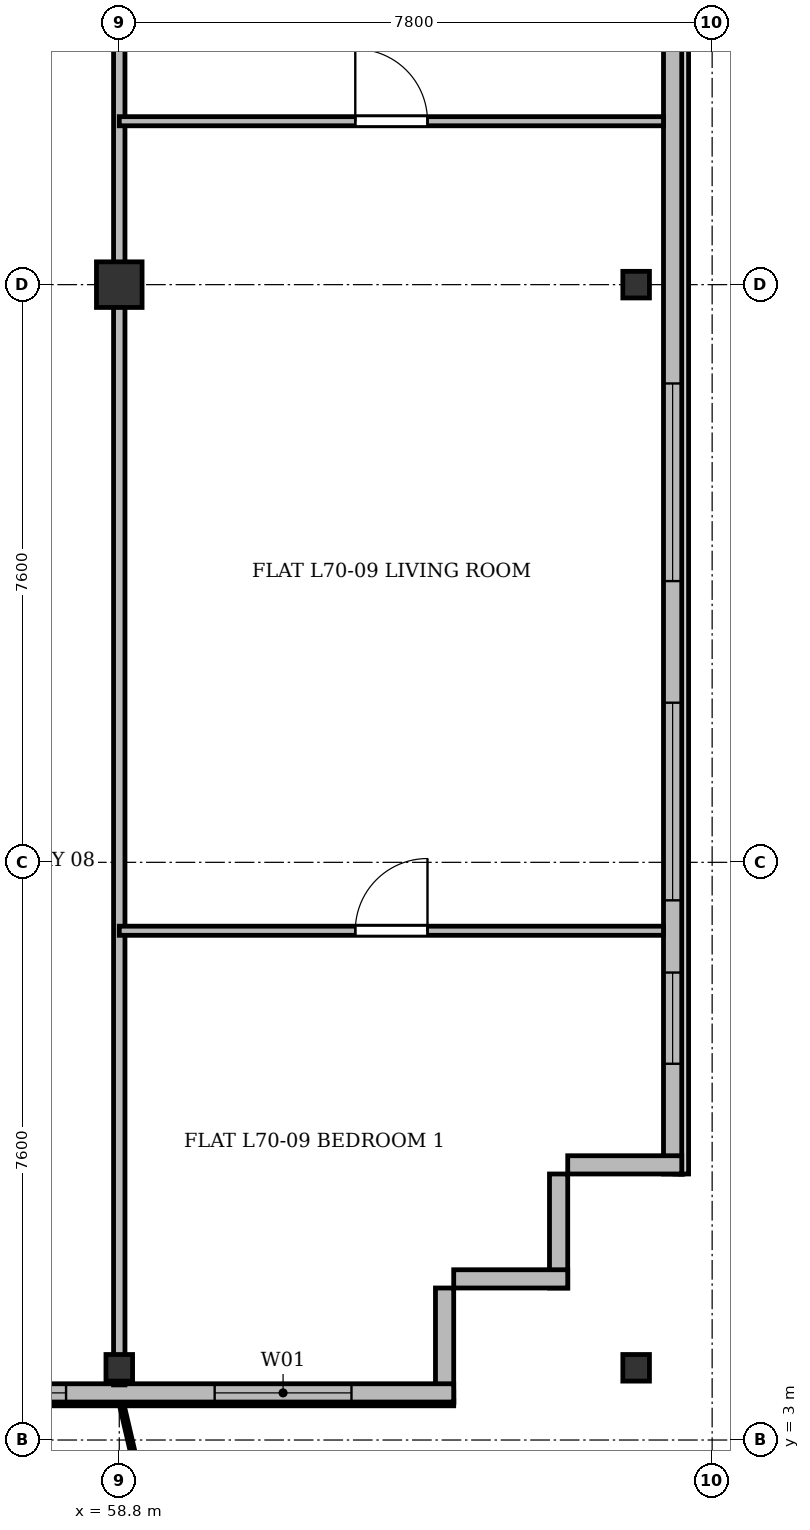
"""IFC4 building model, lengths in metres.
Left out: names, types, materials, properties, quantities, classifications, styles, units other than length and angle.
Written with IfcOpenShell. Run it as: python <this file> out.ifc"""

import sys

from ifc_helpers import new_model, si_unit, direction, frame, frame_2d, origin, origin_2d, place, context, subcontext, project, spatial, rectangle, i_section, extrude, source, transform, mapped, element, fill, save


model = new_model("IFC4")
c1 = context("Model", 3, precision=1e-05, world=origin(), true_north=direction((0.0, 1.0)))
c2 = subcontext(c1, "Body", "Model", "MODEL_VIEW")
j1 = project(units=[si_unit("LENGTHUNIT", "METRE"), si_unit("PLANEANGLEUNIT", "RADIAN")], contexts=[c1])
p1 = place(None, origin())
s1 = spatial("IfcSite", under=j1, at=p1, CompositionType="ELEMENT")
p2 = place(p1, origin())
s2 = spatial("IfcBuilding", under=s1, at=p2, CompositionType="ELEMENT")
p3 = place(p2, frame((0.0, 0.0, 270.3)))
s3 = spatial("IfcBuildingStorey", under=s2, at=p3, CompositionType="ELEMENT", Elevation=270.3)
m1 = source(origin(), c2, "Body", "SweptSolid", [
    extrude(i_section(OverallWidth=0.35, OverallDepth=0.35, WebThickness=0.018, FlangeThickness=0.028, at=origin_2d()), origin(), (0.0, 0.0, 1.0), 3.6),
])
p4 = place(p3, frame((58.8, 3.95, 0.0), z_axis=(0.0, 0.0, 1.0), x_axis=(1.0, 0.0, 0.0)))
e1 = element("IfcColumn", 1, at=p4, inside=s3, PredefinedType="COLUMN", context=c2, shape_type="MappedRepresentation", body=[
    mapped(m1, transform((0.0, 0.0, 0.0), x_axis=(1.0, 0.0, 0.0), y_axis=(0.0, 1.0, 0.0), z_axis=(0.0, 0.0, 1.0), scale=1.0)),
])
m2 = source(origin(), c2, "Body", "SweptSolid", [
    extrude(rectangle(XDim=0.6, YDim=0.6, at=origin_2d()), origin(), (0.0, 0.0, 1.0), 3.6),
])
p5 = place(p3, frame((58.8, 18.2, 0.0), z_axis=(0.0, 0.0, 1.0), x_axis=(1.0, 0.0, 0.0)))
e2 = element("IfcColumn", 2, at=p5, inside=s3, PredefinedType="COLUMN", context=c2, shape_type="MappedRepresentation", body=[
    mapped(m2, transform((0.0, 0.0, 0.0), x_axis=(1.0, 0.0, 0.0), y_axis=(0.0, 1.0, 0.0), z_axis=(0.0, 0.0, 1.0), scale=1.0)),
])
for number, where, z_axis, x_axis in (
    (3, (65.6, 3.95, 0.0), (0.0, 0.0, 1.0), (1.0, 0.0, 0.0)),
    (4, (65.6, 18.2, 0.0), (0.0, 0.0, 1.0), (1.0, 0.0, 0.0)),
):
    element("IfcColumn", number, at=place(p3, frame(where, z_axis=z_axis, x_axis=x_axis)), inside=s3, PredefinedType="COLUMN", context=c2, shape_type="MappedRepresentation", body=[
        mapped(m1, transform((0.0, 0.0, 0.0), x_axis=(1.0, 0.0, 0.0), y_axis=(0.0, 1.0, 0.0), z_axis=(0.0, 0.0, 1.0), scale=1.0)),
    ])
p6 = place(p3, frame((66.08, 45.5, 0.0), z_axis=(0.0, 0.0, 1.0), x_axis=(0.0, -1.0, 0.0)))
e5 = element("IfcWall", 5, at=p6, inside=s3, PredefinedType="SOLIDWALL", context=c2, shape_type="SweptSolid", body=[
    extrude(rectangle(XDim=39.0, YDim=0.24, at=frame_2d((19.5, 0.0))), origin(), (0.0, 0.0, 1.0), 3.37),
])
p7 = place(p6, frame((36.35, 0.0, 0.92)))
e6 = element("IfcOpeningElement", 6, at=p7, cuts=e5, PredefinedType="OPENING", context=c2, shape_type="SweptSolid", body=[
    extrude(rectangle(XDim=1.2, YDim=1.65, at=frame_2d((0.6, 0.825))), frame((0.0, 0.13, 0.0), z_axis=(0.0, -1.0, 0.0), x_axis=(1.0, 0.0, 0.0)), (0.0, 0.0, 1.0), 0.26),
])
p8 = place(p6, frame((32.8, 0.0, 0.92)))
e7 = element("IfcOpeningElement", 7, at=p8, cuts=e5, PredefinedType="OPENING", context=c2, shape_type="SweptSolid", body=[
    extrude(rectangle(XDim=2.6, YDim=1.9, at=frame_2d((1.3, 0.95))), frame((0.0, 0.13, 0.0), z_axis=(0.0, -1.0, 0.0), x_axis=(1.0, 0.0, 0.0)), (0.0, 0.0, 1.0), 0.26),
])
p9 = place(p6, frame((28.6, 0.0, 0.92)))
e8 = element("IfcOpeningElement", 8, at=p9, cuts=e5, PredefinedType="OPENING", context=c2, shape_type="SweptSolid", body=[
    extrude(rectangle(XDim=2.6, YDim=1.9, at=frame_2d((1.3, 0.95))), frame((0.0, 0.13, 0.0), z_axis=(0.0, -1.0, 0.0), x_axis=(1.0, 0.0, 0.0)), (0.0, 0.0, 1.0), 0.26),
])
p10 = place(p6, frame((21.4, 0.0, 0.92)))
e9 = element("IfcOpeningElement", 9, at=p10, cuts=e5, PredefinedType="OPENING", context=c2, shape_type="SweptSolid", body=[
    extrude(rectangle(XDim=2.6, YDim=1.9, at=frame_2d((1.3, 0.95))), frame((0.0, 0.13, 0.0), z_axis=(0.0, -1.0, 0.0), x_axis=(1.0, 0.0, 0.0)), (0.0, 0.0, 1.0), 0.26),
])
p11 = place(p6, frame((7.4, 0.0, 0.92)))
e10 = element("IfcOpeningElement", 10, at=p11, cuts=e5, PredefinedType="OPENING", context=c2, shape_type="SweptSolid", body=[
    extrude(rectangle(XDim=2.6, YDim=1.9, at=frame_2d((1.3, 0.95))), frame((0.0, 0.13, 0.0), z_axis=(0.0, -1.0, 0.0), x_axis=(1.0, 0.0, 0.0)), (0.0, 0.0, 1.0), 0.26),
])
p12 = place(p6, frame((4.5, 0.0, 0.92)))
e11 = element("IfcOpeningElement", 11, at=p12, cuts=e5, PredefinedType="OPENING", context=c2, shape_type="SweptSolid", body=[
    extrude(rectangle(XDim=1.2, YDim=1.65, at=frame_2d((0.6, 0.825))), frame((0.0, 0.13, 0.0), z_axis=(0.0, -1.0, 0.0), x_axis=(1.0, 0.0, 0.0)), (0.0, 0.0, 1.0), 0.26),
])
p13 = place(p6, frame((1.15, 0.0, 0.92)))
e12 = element("IfcOpeningElement", 12, at=p13, cuts=e5, PredefinedType="OPENING", context=c2, shape_type="SweptSolid", body=[
    extrude(rectangle(XDim=1.2, YDim=1.65, at=frame_2d((0.6, 0.825))), frame((0.0, 0.13, 0.0), z_axis=(0.0, -1.0, 0.0), x_axis=(1.0, 0.0, 0.0)), (0.0, 0.0, 1.0), 0.26),
])
p14 = place(p3, frame((66.2, 6.62, 0.0), z_axis=(0.0, 0.0, 1.0), x_axis=(-1.0, 0.0, 0.0)))
e13 = element("IfcWall", 13, at=p14, inside=s3, PredefinedType="SOLIDWALL", context=c2, shape_type="SweptSolid", body=[
    extrude(rectangle(XDim=1.5, YDim=0.24, at=frame_2d((0.75, 0.0))), origin(), (0.0, 0.0, 1.0), 2.87),
])
for number, where, z_axis, x_axis in (
    (14, (64.58, 6.5, 0.0), (0.0, 0.0, 1.0), (0.0, -1.0, 0.0)),
    (15, (64.7, 5.12, 0.0), (0.0, 0.0, 1.0), (-1.0, 0.0, 0.0)),
):
    element("IfcWall", number, at=place(p3, frame(where, z_axis=z_axis, x_axis=x_axis)), inside=s3, PredefinedType="SOLIDWALL", context=c2, shape_type="SweptSolid", body=[
        extrude(rectangle(XDim=1.5, YDim=0.24, at=frame_2d((0.75, 0.0))), origin(), (0.0, 0.0, 1.0), 3.37),
    ])
p15 = place(p3, frame((63.08, 5.0, 0.0), z_axis=(0.0, 0.0, 1.0), x_axis=(0.0, -1.0, 0.0)))
e16 = element("IfcWall", 16, at=p15, inside=s3, PredefinedType="SOLIDWALL", context=c2, shape_type="SweptSolid", body=[
    extrude(rectangle(XDim=1.5, YDim=0.24, at=frame_2d((0.75, 0.0))), origin(), (0.0, 0.0, 1.0), 2.92),
])
p16 = place(p3, frame((63.2, 3.62, 0.0), z_axis=(0.0, 0.0, 1.0), x_axis=(-1.0, 0.0, 0.0)))
e17 = element("IfcWall", 17, at=p16, inside=s3, PredefinedType="SOLIDWALL", context=c2, shape_type="SweptSolid", body=[
    extrude(rectangle(XDim=52.0, YDim=0.24, at=frame_2d((26.0, 0.0))), origin(), (0.0, 0.0, 1.0), 3.37),
])
p17 = place(p16, frame((1.345, 0.0, 0.9)))
e18 = element("IfcOpeningElement", 18, at=p17, cuts=e17, PredefinedType="OPENING", context=c2, shape_type="SweptSolid", body=[
    extrude(rectangle(XDim=1.8, YDim=1.8, at=frame_2d((0.9, 0.9))), frame((0.0, 0.13, 0.0), z_axis=(0.0, -1.0, 0.0), x_axis=(1.0, 0.0, 0.0)), (0.0, 0.0, 1.0), 0.26),
])
p18 = place(p16, frame((5.1, 0.0, 0.9)))
e19 = element("IfcOpeningElement", 19, at=p18, cuts=e17, PredefinedType="OPENING", context=c2, shape_type="SweptSolid", body=[
    extrude(rectangle(XDim=2.2, YDim=1.8, at=frame_2d((1.1, 0.9))), frame((0.0, 0.13, 0.0), z_axis=(0.0, -1.0, 0.0), x_axis=(1.0, 0.0, 0.0)), (0.0, 0.0, 1.0), 0.26),
])
p19 = place(p16, frame((9.35, 0.0, 0.9)))
e20 = element("IfcOpeningElement", 20, at=p19, cuts=e17, PredefinedType="OPENING", context=c2, shape_type="SweptSolid", body=[
    extrude(rectangle(XDim=1.5, YDim=1.75, at=frame_2d((0.75, 0.875))), frame((0.0, 0.13, 0.0), z_axis=(0.0, -1.0, 0.0), x_axis=(1.0, 0.0, 0.0)), (0.0, 0.0, 1.0), 0.26),
])
p20 = place(p16, frame((14.017, 0.0, 0.0)))
e21 = element("IfcOpeningElement", 21, at=p20, cuts=e17, PredefinedType="OPENING", context=c2, shape_type="SweptSolid", body=[
    extrude(rectangle(XDim=1.2, YDim=2.2, at=frame_2d((0.6, 1.1))), frame((0.0, 0.13, 0.0), z_axis=(0.0, -1.0, 0.0), x_axis=(1.0, 0.0, 0.0)), (0.0, 0.0, 1.0), 0.26),
])
p21 = place(p16, frame((25.175, 0.0, 0.9)))
e22 = element("IfcOpeningElement", 22, at=p21, cuts=e17, PredefinedType="OPENING", context=c2, shape_type="SweptSolid", body=[
    extrude(rectangle(XDim=1.65, YDim=1.85, at=frame_2d((0.825, 0.925))), frame((0.0, 0.13, 0.0), z_axis=(0.0, -1.0, 0.0), x_axis=(1.0, 0.0, 0.0)), (0.0, 0.0, 1.0), 0.26),
])
p22 = place(p16, frame((33.01, 0.0, 0.9)))
e23 = element("IfcOpeningElement", 23, at=p22, cuts=e17, PredefinedType="OPENING", context=c2, shape_type="SweptSolid", body=[
    extrude(rectangle(XDim=1.8, YDim=1.8, at=frame_2d((0.9, 0.9))), frame((0.0, 0.13, 0.0), z_axis=(0.0, -1.0, 0.0), x_axis=(1.0, 0.0, 0.0)), (0.0, 0.0, 1.0), 0.26),
])
p23 = place(p16, frame((35.45, 0.0, 0.9)))
e24 = element("IfcOpeningElement", 24, at=p23, cuts=e17, PredefinedType="OPENING", context=c2, shape_type="SweptSolid", body=[
    extrude(rectangle(XDim=1.5, YDim=1.75, at=frame_2d((0.75, 0.875))), frame((0.0, 0.13, 0.0), z_axis=(0.0, -1.0, 0.0), x_axis=(1.0, 0.0, 0.0)), (0.0, 0.0, 1.0), 0.26),
])
p24 = place(p16, frame((37.85, 0.0, 0.9)))
e25 = element("IfcOpeningElement", 25, at=p24, cuts=e17, PredefinedType="OPENING", context=c2, shape_type="SweptSolid", body=[
    extrude(rectangle(XDim=1.5, YDim=1.75, at=frame_2d((0.75, 0.875))), frame((0.0, 0.13, 0.0), z_axis=(0.0, -1.0, 0.0), x_axis=(1.0, 0.0, 0.0)), (0.0, 0.0, 1.0), 0.26),
])
p25 = place(p16, frame((41.452, 0.0, 0.0)))
e26 = element("IfcOpeningElement", 26, at=p25, cuts=e17, PredefinedType="OPENING", context=c2, shape_type="SweptSolid", body=[
    extrude(rectangle(XDim=1.2, YDim=2.2, at=frame_2d((0.6, 1.1))), frame((0.0, 0.13, 0.0), z_axis=(0.0, -1.0, 0.0), x_axis=(1.0, 0.0, 0.0)), (0.0, 0.0, 1.0), 0.26),
])
p26 = place(p16, frame((44.575, 0.0, 0.9)))
e27 = element("IfcOpeningElement", 27, at=p26, cuts=e17, PredefinedType="OPENING", context=c2, shape_type="SweptSolid", body=[
    extrude(rectangle(XDim=1.65, YDim=1.85, at=frame_2d((0.825, 0.925))), frame((0.0, 0.13, 0.0), z_axis=(0.0, -1.0, 0.0), x_axis=(1.0, 0.0, 0.0)), (0.0, 0.0, 1.0), 0.26),
])
p27 = place(p16, frame((48.855, 0.0, 0.9)))
e28 = element("IfcOpeningElement", 28, at=p27, cuts=e17, PredefinedType="OPENING", context=c2, shape_type="SweptSolid", body=[
    extrude(rectangle(XDim=1.8, YDim=1.8, at=frame_2d((0.9, 0.9))), frame((0.0, 0.13, 0.0), z_axis=(0.0, -1.0, 0.0), x_axis=(1.0, 0.0, 0.0)), (0.0, 0.0, 1.0), 0.26),
])
p28 = place(p3, frame((58.8, 3.725, 0.0), z_axis=(0.0, 0.0, 1.0), x_axis=(0.0, 1.0, 0.0)))
e29 = element("IfcWall", 29, at=p28, inside=s3, PredefinedType="PARTITIONING", context=c2, shape_type="SweptSolid", body=[
    extrude(rectangle(XDim=27.275, YDim=0.15, at=frame_2d((13.637, 0.0))), origin(), (0.0, 0.0, 1.0), 2.87),
])
p29 = place(p3, frame((58.8, 20.35, 0.0), z_axis=(0.0, 0.0, 1.0), x_axis=(1.0, 0.0, 0.0)))
e30 = element("IfcWall", 30, at=p29, inside=s3, PredefinedType="PARTITIONING", context=c2, shape_type="SweptSolid", body=[
    extrude(rectangle(XDim=7.16, YDim=0.12, at=frame_2d((3.58, 0.0))), origin(), (0.0, 0.0, 1.0), 2.87),
])
p30 = place(p29, frame((3.105, 0.0, 0.0)))
e31 = element("IfcOpeningElement", 31, at=p30, cuts=e30, PredefinedType="OPENING", context=c2, shape_type="SweptSolid", body=[
    extrude(rectangle(XDim=0.95, YDim=2.15, at=frame_2d((0.475, 1.075))), frame((0.0, 0.07, 0.0), z_axis=(0.0, -1.0, 0.0), x_axis=(1.0, 0.0, 0.0)), (0.0, 0.0, 1.0), 0.14),
])
p31 = place(p3, frame((58.8, 9.7, 0.0), z_axis=(0.0, 0.0, 1.0), x_axis=(1.0, 0.0, 0.0)))
e32 = element("IfcWall", 32, at=p31, inside=s3, PredefinedType="PARTITIONING", context=c2, shape_type="SweptSolid", body=[
    extrude(rectangle(XDim=7.16, YDim=0.12, at=frame_2d((3.58, 0.0))), origin(), (0.0, 0.0, 1.0), 2.87),
])
p32 = place(p31, frame((3.105, 0.0, 0.0)))
e33 = element("IfcOpeningElement", 33, at=p32, cuts=e32, PredefinedType="OPENING", context=c2, shape_type="SweptSolid", body=[
    extrude(rectangle(XDim=0.95, YDim=2.15, at=frame_2d((0.475, 1.075))), frame((0.0, 0.07, 0.0), z_axis=(0.0, -1.0, 0.0), x_axis=(1.0, 0.0, 0.0)), (0.0, 0.0, 1.0), 0.14),
])
m3 = source(origin(), c2, "Body", "SweptSolid", [
    extrude(rectangle(XDim=1.2, YDim=1.65, at=frame_2d((0.6, 0.825))), frame((0.0, 0.03, 0.0), z_axis=(0.0, -1.0, 0.0), x_axis=(1.0, 0.0, 0.0)), (0.0, 0.0, 1.0), 0.06),
])
p33 = place(p7, origin())
e34 = element("IfcWindow", 34, at=p33, inside=s3, PartitioningType="SINGLE_PANEL", PredefinedType="WINDOW", context=c2, shape_type="MappedRepresentation", body=[
    mapped(m3, transform((0.0, 0.0, 0.0), x_axis=(1.0, 0.0, 0.0), y_axis=(0.0, 1.0, 0.0), z_axis=(0.0, 0.0, 1.0), scale=1.0)),
])
fill(e6, e34)
m4 = source(origin(), c2, "Body", "SweptSolid", [
    extrude(rectangle(XDim=2.6, YDim=1.9, at=frame_2d((1.3, 0.95))), frame((0.0, 0.03, 0.0), z_axis=(0.0, -1.0, 0.0), x_axis=(1.0, 0.0, 0.0)), (0.0, 0.0, 1.0), 0.06),
])
p34 = place(p8, origin())
e35 = element("IfcWindow", 35, at=p34, inside=s3, PartitioningType="SINGLE_PANEL", PredefinedType="WINDOW", context=c2, shape_type="MappedRepresentation", body=[
    mapped(m4, transform((0.0, 0.0, 0.0), x_axis=(1.0, 0.0, 0.0), y_axis=(0.0, 1.0, 0.0), z_axis=(0.0, 0.0, 1.0), scale=1.0)),
])
fill(e7, e35)
p35 = place(p9, origin())
e36 = element("IfcWindow", 36, at=p35, inside=s3, PartitioningType="SINGLE_PANEL", PredefinedType="WINDOW", context=c2, shape_type="MappedRepresentation", body=[
    mapped(m4, transform((0.0, 0.0, 0.0), x_axis=(1.0, 0.0, 0.0), y_axis=(0.0, 1.0, 0.0), z_axis=(0.0, 0.0, 1.0), scale=1.0)),
])
fill(e8, e36)
m5 = source(origin(), c2, "Body", "SweptSolid", [
    extrude(rectangle(XDim=1.8, YDim=1.8, at=frame_2d((0.9, 0.9))), frame((0.0, 0.03, 0.0), z_axis=(0.0, -1.0, 0.0), x_axis=(1.0, 0.0, 0.0)), (0.0, 0.0, 1.0), 0.06),
])
p36 = place(p17, origin())
e37 = element("IfcWindow", 37, at=p36, inside=s3, PartitioningType="SINGLE_PANEL", PredefinedType="WINDOW", context=c2, shape_type="MappedRepresentation", body=[
    mapped(m5, transform((0.0, 0.0, 0.0), x_axis=(1.0, 0.0, 0.0), y_axis=(0.0, 1.0, 0.0), z_axis=(0.0, 0.0, 1.0), scale=1.0)),
])
fill(e18, e37)
m6 = source(origin(), c2, "Body", "SweptSolid", [
    extrude(rectangle(XDim=2.2, YDim=1.8, at=frame_2d((1.1, 0.9))), frame((0.0, 0.03, 0.0), z_axis=(0.0, -1.0, 0.0), x_axis=(1.0, 0.0, 0.0)), (0.0, 0.0, 1.0), 0.06),
])
p37 = place(p18, origin())
e38 = element("IfcWindow", 38, at=p37, inside=s3, PartitioningType="SINGLE_PANEL", PredefinedType="WINDOW", context=c2, shape_type="MappedRepresentation", body=[
    mapped(m6, transform((0.0, 0.0, 0.0), x_axis=(1.0, 0.0, 0.0), y_axis=(0.0, 1.0, 0.0), z_axis=(0.0, 0.0, 1.0), scale=1.0)),
])
fill(e19, e38)
m7 = source(origin(), c2, "Body", "SweptSolid", [
    extrude(rectangle(XDim=0.95, YDim=2.15, at=frame_2d((0.475, 1.075))), frame((0.0, 0.025, 0.0), z_axis=(0.0, -1.0, 0.0), x_axis=(1.0, 0.0, 0.0)), (0.0, 0.0, 1.0), 0.05),
])
p38 = place(p30, origin())
e39 = element("IfcDoor", 39, at=p38, inside=s3, OperationType="SINGLE_SWING_LEFT", PredefinedType="DOOR", context=c2, shape_type="MappedRepresentation", body=[
    mapped(m7, transform((0.0, 0.0, 0.0), x_axis=(1.0, 0.0, 0.0), y_axis=(0.0, 1.0, 0.0), z_axis=(0.0, 0.0, 1.0), scale=1.0)),
])
fill(e31, e39)
p39 = place(p32, origin())
e40 = element("IfcDoor", 40, at=p39, inside=s3, OperationType="SINGLE_SWING_RIGHT", PredefinedType="DOOR", context=c2, shape_type="MappedRepresentation", body=[
    mapped(m7, transform((0.0, 0.0, 0.0), x_axis=(1.0, 0.0, 0.0), y_axis=(0.0, 1.0, 0.0), z_axis=(0.0, 0.0, 1.0), scale=1.0)),
])
fill(e33, e40)
save(model, sys.argv[1])
